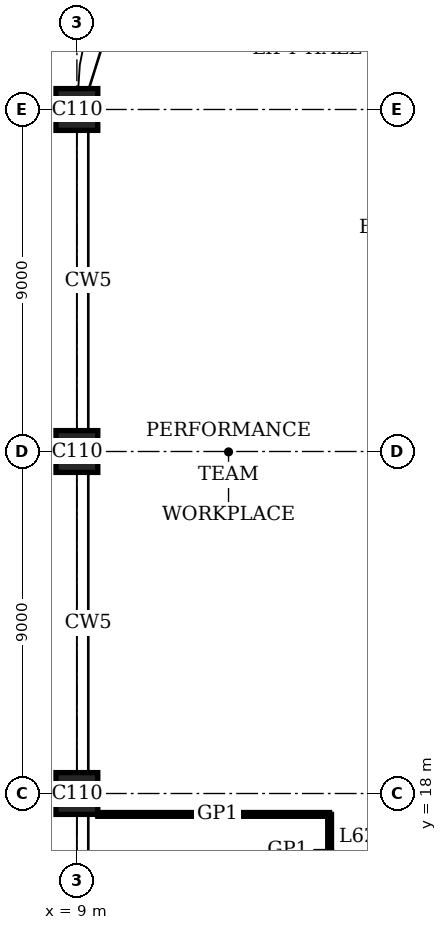
"""IFC4 building model, lengths in metres.
Left out: names, types, materials, properties, quantities, classifications, styles, units other than length and angle.
Written with IfcOpenShell. Run it as: python <this file> out.ifc"""

import sys

from ifc_helpers import new_model, si_unit, direction, frame, frame_2d, origin, origin_2d, place, context, subcontext, project, spatial, rectangle, extrude, element, save


model = new_model("IFC4")
c1 = context("Model", 3, precision=1e-05, world=origin(), true_north=direction((0.0, 1.0)))
c2 = subcontext(c1, "Body", "Model", "MODEL_VIEW")
j1 = project(units=[si_unit("LENGTHUNIT", "METRE"), si_unit("PLANEANGLEUNIT", "RADIAN")], contexts=[c1])
p1 = place(None, origin())
s1 = spatial("IfcSite", under=j1, at=p1, CompositionType="ELEMENT")
p2 = place(p1, origin())
s2 = spatial("IfcBuilding", under=s1, at=p2, CompositionType="ELEMENT")
p3 = place(p2, frame((0.0, 0.0, 255.4)))
s3 = spatial("IfcBuildingStorey", under=s2, at=p3, CompositionType="ELEMENT", Elevation=255.4)
for number, where, z_axis, x_axis in (
    (1, (9.0, 18.0, 0.0), (0.0, 0.0, 1.0), (1.0, 0.0, 0.0)),
    (2, (9.0, 27.0, 0.0), (0.0, 0.0, 1.0), (1.0, 0.0, 0.0)),
    (3, (9.0, 36.0, 0.0), (0.0, 0.0, 1.0), (1.0, 0.0, 0.0)),
):
    element("IfcColumn", number, at=place(p3, frame(where, z_axis=z_axis, x_axis=x_axis)), inside=s3, PredefinedType="COLUMN", context=c2, shape_type="SweptSolid", body=[
        extrude(rectangle(XDim=1.1, YDim=1.1, at=origin_2d()), origin(), (0.0, 0.0, 1.0), 4.0),
    ])
p4 = place(p3, frame((9.55, 17.45, 0.0), z_axis=(0.0, 0.0, 1.0), x_axis=(1.0, 0.0, 0.0)))
e4 = element("IfcWall", 4, at=p4, inside=s3, PredefinedType="PARTITIONING", context=c2, shape_type="SweptSolid", body=[
    extrude(rectangle(XDim=6.1, YDim=0.1, at=frame_2d((3.05, 0.0))), origin(), (0.0, 0.0, 1.0), 3.75),
])
p5 = place(p3, frame((15.65, 15.6, 0.0), z_axis=(0.0, 0.0, 1.0), x_axis=(0.0, 1.0, 0.0)))
e5 = element("IfcWall", 5, at=p5, inside=s3, PredefinedType="PARTITIONING", context=c2, shape_type="SweptSolid", body=[
    extrude(rectangle(XDim=1.85, YDim=0.1, at=frame_2d((0.925, 0.0))), origin(), (0.0, 0.0, 1.0), 3.75),
])
save(model, sys.argv[1])
